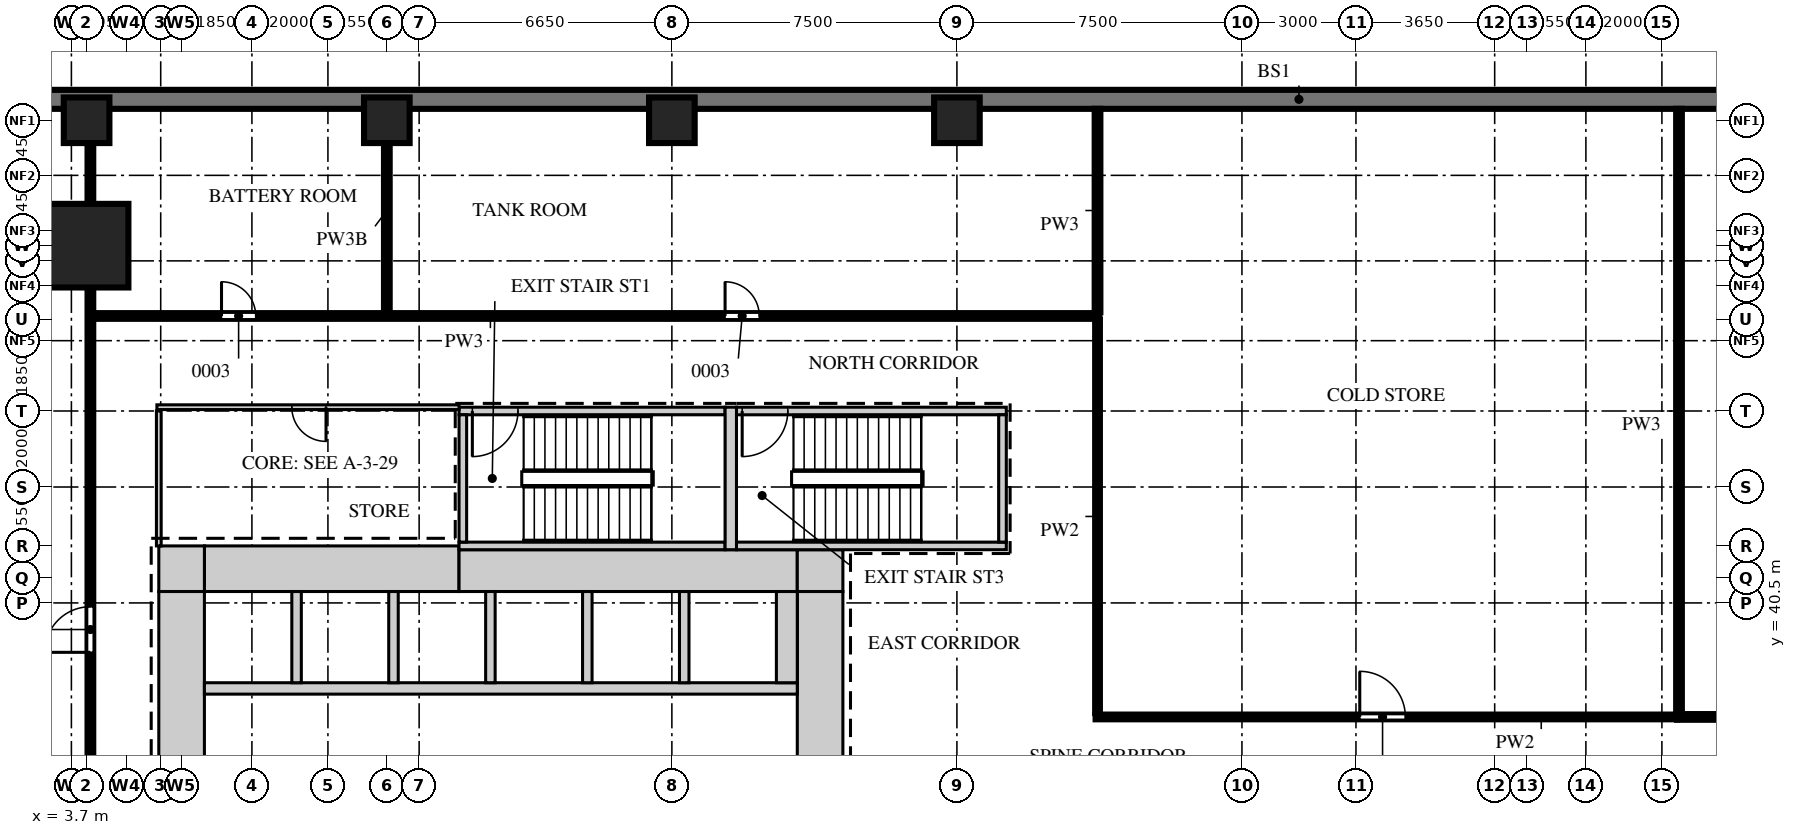
"""IFC4 building model, lengths in metres.
Left out: names, types, materials, properties, quantities, classifications, styles, units other than length and angle.
Written with IfcOpenShell. Run it as: python <this file> out.ifc"""

import sys

from ifc_helpers import new_model, si_unit, direction, frame, frame_2d, origin, origin_2d, place, context, subcontext, project, spatial, rectangle, extrude, source, transform, mapped, element, fill, save


model = new_model("IFC4")
c1 = context("Model", 3, precision=1e-05, world=origin(), true_north=direction((0.0, 1.0)))
c2 = subcontext(c1, "Body", "Model", "MODEL_VIEW")
j1 = project(units=[si_unit("LENGTHUNIT", "METRE"), si_unit("PLANEANGLEUNIT", "RADIAN")], contexts=[c1])
p1 = place(None, origin())
s1 = spatial("IfcSite", under=j1, at=p1, CompositionType="ELEMENT")
p2 = place(p1, origin())
s2 = spatial("IfcBuilding", under=s1, at=p2, CompositionType="ELEMENT")
p3 = place(p2, frame((0.0, 0.0, -9.0)))
s3 = spatial("IfcBuildingStorey", under=s2, at=p3, CompositionType="ELEMENT", Elevation=-9.0)
m1 = source(origin(), c2, "Body", "SweptSolid", [
    extrude(rectangle(XDim=6.7, YDim=1.2, at=frame_2d((3.35, 0.0))), origin(), (0.0, 0.0, 1.0), 4.2),
])
p4 = place(p3, frame((7.2, 41.4, 0.0), z_axis=(0.0, 0.0, 1.0), x_axis=(1.0, 0.0, 0.0)))
e1 = element("IfcWall", 1, at=p4, inside=s3, PredefinedType="SHEAR", context=c2, shape_type="MappedRepresentation", body=[
    mapped(m1, transform((0.0, 0.0, 0.0))),
])
m2 = source(origin(), c2, "Body", "SweptSolid", [
    extrude(rectangle(XDim=8.9, YDim=1.1, at=frame_2d((4.45, 0.0))), origin(), (0.0, 0.0, 1.0), 4.2),
])
p5 = place(p3, frame((13.9, 41.35, 0.0), z_axis=(0.0, 0.0, 1.0), x_axis=(1.0, 0.0, 0.0)))
e2 = element("IfcWall", 2, at=p5, inside=s3, PredefinedType="SHEAR", context=c2, shape_type="MappedRepresentation", body=[
    mapped(m2, transform((0.0, 0.0, 0.0))),
])
m3 = source(origin(), c2, "Body", "SweptSolid", [
    extrude(rectangle(XDim=1.2, YDim=1.1, at=frame_2d((0.6, 0.0))), origin(), (0.0, 0.0, 1.0), 4.2),
])
p6 = place(p3, frame((22.8, 41.35, 0.0), z_axis=(0.0, 0.0, 1.0), x_axis=(1.0, 0.0, 0.0)))
e3 = element("IfcWall", 3, at=p6, inside=s3, PredefinedType="SHEAR", context=c2, shape_type="MappedRepresentation", body=[
    mapped(m3, transform((0.0, 0.0, 0.0))),
])
m4 = source(origin(), c2, "Body", "SweptSolid", [
    extrude(rectangle(XDim=1.2, YDim=1.2, at=frame_2d((0.6, 0.0))), origin(), (0.0, 0.0, 1.0), 4.2),
])
p7 = place(p3, frame((6.0, 41.4, 0.0), z_axis=(0.0, 0.0, 1.0), x_axis=(1.0, 0.0, 0.0)))
e4 = element("IfcWall", 4, at=p7, inside=s3, PredefinedType="SHEAR", context=c2, shape_type="MappedRepresentation", body=[
    mapped(m4, transform((0.0, 0.0, 0.0))),
])
m5 = source(origin(), c2, "Body", "SweptSolid", [
    extrude(rectangle(XDim=27.6, YDim=1.2, at=frame_2d((13.8, 0.0))), origin(), (0.0, 0.0, 1.0), 4.2),
])
p8 = place(p3, frame((23.4, 13.2, 0.0), z_axis=(0.0, 0.0, 1.0), x_axis=(0.0, 1.0, 0.0)))
e5 = element("IfcWall", 5, at=p8, inside=s3, PredefinedType="SHEAR", context=c2, shape_type="MappedRepresentation", body=[
    mapped(m5, transform((0.0, 0.0, 0.0))),
])
m6 = source(origin(), c2, "Body", "SweptSolid", [
    extrude(rectangle(XDim=1.2, YDim=2.1, at=frame_2d((0.6, 1.05))), frame((0.0, 0.61, 0.0), z_axis=(0.0, -1.0, 0.0), x_axis=(1.0, 0.0, 0.0)), (0.0, 0.0, 1.0), 1.22),
])
p9 = place(p8, frame((12.15, 0.0, 0.0)))
e6 = element("IfcOpeningElement", 6, at=p9, cuts=e5, PredefinedType="OPENING", context=c2, shape_type="MappedRepresentation", body=[
    mapped(m6, transform((0.0, 0.0, 0.0))),
])
m7 = source(origin(), c2, "Body", "SweptSolid", [
    extrude(rectangle(XDim=0.9, YDim=2.1, at=frame_2d((0.45, 1.05))), frame((0.0, 0.61, 0.0), z_axis=(0.0, -1.0, 0.0), x_axis=(1.0, 0.0, 0.0)), (0.0, 0.0, 1.0), 1.22),
])
p10 = place(p8, frame((4.4, 0.0, 0.0)))
e7 = element("IfcOpeningElement", 7, at=p10, cuts=e5, PredefinedType="OPENING", context=c2, shape_type="MappedRepresentation", body=[
    mapped(m7, transform((0.0, 0.0, 0.0))),
])
p11 = place(p3, frame((6.6, 13.2, 0.0), z_axis=(0.0, 0.0, 1.0), x_axis=(0.0, 1.0, 0.0)))
e8 = element("IfcWall", 8, at=p11, inside=s3, PredefinedType="SHEAR", context=c2, shape_type="MappedRepresentation", body=[
    mapped(m5, transform((0.0, 0.0, 0.0))),
])
m8 = source(origin(), c2, "Body", "SweptSolid", [
    extrude(rectangle(XDim=7.0, YDim=0.2, at=frame_2d((3.5, 0.0))), origin(), (0.0, 0.0, 1.0), 4.2),
])
p12 = place(p3, frame((13.9, 45.55, 0.0), z_axis=(0.0, 0.0, 1.0), x_axis=(1.0, 0.0, 0.0)))
e9 = element("IfcWall", 9, at=p12, inside=s3, PredefinedType="SHEAR", context=c2, shape_type="MappedRepresentation", body=[
    mapped(m8, transform((0.0, 0.0, 0.0))),
])
m9 = source(origin(), c2, "Body", "SweptSolid", [
    extrude(rectangle(XDim=1.2, YDim=2.1, at=frame_2d((0.6, 1.05))), frame((0.0, 0.11, 0.0), z_axis=(0.0, -1.0, 0.0), x_axis=(1.0, 0.0, 0.0)), (0.0, 0.0, 1.0), 0.22),
])
p13 = place(p12, frame((0.35, 0.0, 0.0)))
e10 = element("IfcOpeningElement", 10, at=p13, cuts=e9, PredefinedType="OPENING", context=c2, shape_type="MappedRepresentation", body=[
    mapped(m9, transform((0.0, 0.0, 0.0))),
])
p14 = place(p3, frame((13.9, 42.0, 0.0), z_axis=(0.0, 0.0, 1.0), x_axis=(1.0, 0.0, 0.0)))
e11 = element("IfcWall", 11, at=p14, inside=s3, PredefinedType="SHEAR", context=c2, shape_type="MappedRepresentation", body=[
    mapped(m8, transform((0.0, 0.0, 0.0))),
])
m10 = source(origin(), c2, "Body", "SweptSolid", [
    extrude(rectangle(XDim=7.1, YDim=0.2, at=frame_2d((3.55, 0.0))), origin(), (0.0, 0.0, 1.0), 4.2),
])
p15 = place(p3, frame((21.2, 45.55, 0.0), z_axis=(0.0, 0.0, 1.0), x_axis=(1.0, 0.0, 0.0)))
e12 = element("IfcWall", 12, at=p15, inside=s3, PredefinedType="SHEAR", context=c2, shape_type="MappedRepresentation", body=[
    mapped(m10, transform((0.0, 0.0, 0.0))),
])
p16 = place(p15, frame((0.15, 0.0, 0.0)))
e13 = element("IfcOpeningElement", 13, at=p16, cuts=e12, PredefinedType="OPENING", context=c2, shape_type="MappedRepresentation", body=[
    mapped(m9, transform((0.0, 0.0, 0.0))),
])
p17 = place(p3, frame((21.2, 42.0, 0.0), z_axis=(0.0, 0.0, 1.0), x_axis=(1.0, 0.0, 0.0)))
e14 = element("IfcWall", 14, at=p17, inside=s3, PredefinedType="SHEAR", context=c2, shape_type="MappedRepresentation", body=[
    mapped(m10, transform((0.0, 0.0, 0.0))),
])
m11 = source(origin(), c2, "Body", "SweptSolid", [
    extrude(rectangle(XDim=3.75, YDim=0.3, at=frame_2d((1.875, 0.0))), origin(), (0.0, 0.0, 1.0), 4.2),
])
p18 = place(p3, frame((21.05, 41.9, 0.0), z_axis=(0.0, 0.0, 1.0), x_axis=(0.0, 1.0, 0.0)))
e15 = element("IfcWall", 15, at=p18, inside=s3, PredefinedType="SHEAR", context=c2, shape_type="MappedRepresentation", body=[
    mapped(m11, transform((0.0, 0.0, 0.0))),
])
m12 = source(origin(), c2, "Body", "SweptSolid", [
    extrude(rectangle(XDim=3.35, YDim=0.2, at=frame_2d((1.675, 0.0))), origin(), (0.0, 0.0, 1.0), 4.2),
])
for number, where, z_axis, x_axis in (
    (16, (14.0, 42.1, 0.0), (0.0, 0.0, 1.0), (0.0, 1.0, 0.0)),
    (17, (28.2, 42.1, 0.0), (0.0, 0.0, 1.0), (0.0, 1.0, 0.0)),
):
    element("IfcWall", number, at=place(p3, frame(where, z_axis=z_axis, x_axis=x_axis)), inside=s3, PredefinedType="SHEAR", context=c2, shape_type="MappedRepresentation", body=[
        mapped(m12, transform((0.0, 0.0, 0.0))),
    ])
m13 = source(origin(), c2, "Body", "SweptSolid", [
    extrude(rectangle(XDim=15.6, YDim=0.3, at=frame_2d((7.8, 0.0))), origin(), (0.0, 0.0, 1.0), 4.2),
])
p19 = place(p3, frame((7.2, 38.25, 0.0), z_axis=(0.0, 0.0, 1.0), x_axis=(1.0, 0.0, 0.0)))
e18 = element("IfcWall", 18, at=p19, inside=s3, PredefinedType="STANDARD", context=c2, shape_type="MappedRepresentation", body=[
    mapped(m13, transform((0.0, 0.0, 0.0))),
])
m14 = source(origin(), c2, "Body", "SweptSolid", [
    extrude(rectangle(XDim=2.4, YDim=0.25, at=frame_2d((1.2, 0.0))), origin(), (0.0, 0.0, 1.0), 4.2),
])
for number, where, z_axis, x_axis in (
    (19, (9.625, 38.4, 0.0), (0.0, 0.0, 1.0), (0.0, 1.0, 0.0)),
    (20, (12.175, 38.4, 0.0), (0.0, 0.0, 1.0), (0.0, 1.0, 0.0)),
    (21, (14.725, 38.4, 0.0), (0.0, 0.0, 1.0), (0.0, 1.0, 0.0)),
    (22, (17.275, 38.4, 0.0), (0.0, 0.0, 1.0), (0.0, 1.0, 0.0)),
    (23, (19.825, 38.4, 0.0), (0.0, 0.0, 1.0), (0.0, 1.0, 0.0)),
):
    element("IfcWall", number, at=place(p3, frame(where, z_axis=z_axis, x_axis=x_axis)), inside=s3, PredefinedType="STANDARD", context=c2, shape_type="MappedRepresentation", body=[
        mapped(m14, transform((0.0, 0.0, 0.0))),
    ])
m15 = source(origin(), c2, "Body", "SweptSolid", [
    extrude(rectangle(XDim=2.4, YDim=0.55, at=frame_2d((1.2, 0.0))), origin(), (0.0, 0.0, 1.0), 4.2),
])
p20 = place(p3, frame((22.525, 38.4, 0.0), z_axis=(0.0, 0.0, 1.0), x_axis=(0.0, 1.0, 0.0)))
e24 = element("IfcWall", 24, at=p20, inside=s3, PredefinedType="STANDARD", context=c2, shape_type="MappedRepresentation", body=[
    mapped(m15, transform((0.0, 0.0, 0.0))),
])
m16 = source(origin(), c2, "Body", "SweptSolid", [
    extrude(rectangle(XDim=90.0, YDim=0.5, at=frame_2d((45.0, 0.0))), origin(), (0.0, 0.0, 1.0), 4.2),
])
p21 = place(p3, frame((-9.0, 53.75, 0.0), z_axis=(0.0, 0.0, 1.0), x_axis=(1.0, 0.0, 0.0)))
e25 = element("IfcWall", 25, at=p21, inside=s3, PredefinedType="STANDARD", context=c2, shape_type="MappedRepresentation", body=[
    mapped(m16, transform((0.0, 0.0, 0.0))),
])
m17 = source(origin(), c2, "Body", "SweptSolid", [
    extrude(rectangle(XDim=2.2, YDim=2.2, at=origin_2d()), origin(), (0.0, 0.0, 1.0), 4.5),
])
p22 = place(p3, frame((4.1, 49.9, 0.0), z_axis=(0.0, 0.0, 1.0), x_axis=(1.0, 0.0, 0.0)))
e26 = element("IfcColumn", 26, at=p22, inside=s3, PredefinedType="COLUMN", context=c2, shape_type="MappedRepresentation", body=[
    mapped(m17, transform((0.0, 0.0, 0.0))),
])
m18 = source(origin(), c2, "Body", "SweptSolid", [
    extrude(rectangle(XDim=1.2, YDim=1.2, at=origin_2d()), origin(), (0.0, 0.0, 1.0), 4.2),
])
for number, where, z_axis, x_axis in (
    (27, (4.1, 53.2, 0.0), (0.0, 0.0, 1.0), (1.0, 0.0, 0.0)),
    (28, (12.0, 53.2, 0.0), (0.0, 0.0, 1.0), (1.0, 0.0, 0.0)),
    (29, (19.5, 53.2, 0.0), (0.0, 0.0, 1.0), (1.0, 0.0, 0.0)),
    (30, (27.0, 53.2, 0.0), (0.0, 0.0, 1.0), (1.0, 0.0, 0.0)),
):
    element("IfcColumn", number, at=place(p3, frame(where, z_axis=z_axis, x_axis=x_axis)), inside=s3, PredefinedType="COLUMN", context=c2, shape_type="MappedRepresentation", body=[
        mapped(m18, transform((0.0, 0.0, 0.0))),
    ])
m19 = source(origin(), c2, "Body", "SweptSolid", [
    extrude(rectangle(XDim=53.0, YDim=0.15, at=frame_2d((26.5, 0.0))), origin(), (0.0, 0.0, 1.0), 4.2),
])
p23 = place(p3, frame((4.2, 0.5, 0.0), z_axis=(0.0, 0.0, 1.0), x_axis=(0.0, 1.0, 0.0)))
e31 = element("IfcWall", 31, at=p23, inside=s3, PredefinedType="PARTITIONING", context=c2, shape_type="MappedRepresentation", body=[
    mapped(m19, transform((0.0, 0.0, 0.0))),
])
m20 = source(origin(), c2, "Body", "SweptSolid", [
    extrude(rectangle(XDim=1.2, YDim=2.1, at=frame_2d((0.6, 1.05))), frame((0.0, 0.085, 0.0), z_axis=(0.0, -1.0, 0.0), x_axis=(1.0, 0.0, 0.0)), (0.0, 0.0, 1.0), 0.17),
])
p24 = place(p23, frame((11.1, 0.0, 0.0)))
e32 = element("IfcOpeningElement", 32, at=p24, cuts=e31, PredefinedType="OPENING", context=c2, shape_type="MappedRepresentation", body=[
    mapped(m20, transform((0.0, 0.0, 0.0))),
])
p25 = place(p23, frame((23.9, 0.0, 0.0)))
e33 = element("IfcOpeningElement", 33, at=p25, cuts=e31, PredefinedType="OPENING", context=c2, shape_type="MappedRepresentation", body=[
    mapped(m20, transform((0.0, 0.0, 0.0))),
])
p26 = place(p23, frame((38.7, 0.0, 0.0)))
e34 = element("IfcOpeningElement", 34, at=p26, cuts=e31, PredefinedType="OPENING", context=c2, shape_type="MappedRepresentation", body=[
    mapped(m20, transform((0.0, 0.0, 0.0))),
])
m21 = source(origin(), c2, "Body", "SweptSolid", [
    extrude(rectangle(XDim=15.3, YDim=0.125, at=frame_2d((7.65, 0.0))), origin(), (0.0, 0.0, 1.0), 4.2),
])
p27 = place(p3, frame((30.65, 37.5, 0.0), z_axis=(0.0, 0.0, 1.0), x_axis=(1.0, 0.0, 0.0)))
e35 = element("IfcWall", 35, at=p27, inside=s3, PredefinedType="PARTITIONING", context=c2, shape_type="MappedRepresentation", body=[
    mapped(m21, transform((0.0, 0.0, 0.0))),
])
m22 = source(origin(), c2, "Body", "SweptSolid", [
    extrude(rectangle(XDim=1.2, YDim=2.1, at=frame_2d((0.6, 1.05))), frame((0.0, 0.073, 0.0), z_axis=(0.0, -1.0, 0.0), x_axis=(1.0, 0.0, 0.0)), (0.0, 0.0, 1.0), 0.145),
])
p28 = place(p27, frame((6.95, 0.0, 0.0)))
e36 = element("IfcOpeningElement", 36, at=p28, cuts=e35, PredefinedType="OPENING", context=c2, shape_type="MappedRepresentation", body=[
    mapped(m22, transform((0.0, 0.0, 0.0))),
])
m23 = source(origin(), c2, "Body", "SweptSolid", [
    extrude(rectangle(XDim=34.55, YDim=0.15, at=frame_2d((17.275, 0.0))), origin(), (0.0, 0.0, 1.0), 4.2),
])
p29 = place(p3, frame((45.95, 37.5, 0.0), z_axis=(0.0, 0.0, 1.0), x_axis=(1.0, 0.0, 0.0)))
e37 = element("IfcWall", 37, at=p29, inside=s3, PredefinedType="PARTITIONING", context=c2, shape_type="MappedRepresentation", body=[
    mapped(m23, transform((0.0, 0.0, 0.0))),
])
p30 = place(p29, frame((7.45, 0.0, 0.0)))
e38 = element("IfcOpeningElement", 38, at=p30, cuts=e37, PredefinedType="OPENING", context=c2, shape_type="MappedRepresentation", body=[
    mapped(m20, transform((0.0, 0.0, 0.0))),
])
p31 = place(p29, frame((24.95, 0.0, 0.0)))
e39 = element("IfcOpeningElement", 39, at=p31, cuts=e37, PredefinedType="OPENING", context=c2, shape_type="MappedRepresentation", body=[
    mapped(m20, transform((0.0, 0.0, 0.0))),
])
m24 = source(origin(), c2, "Body", "SweptSolid", [
    extrude(rectangle(XDim=10.35, YDim=0.125, at=frame_2d((5.175, 0.0))), origin(), (0.0, 0.0, 1.0), 4.2),
])
p32 = place(p3, frame((30.7, 37.6, 0.0), z_axis=(0.0, 0.0, 1.0), x_axis=(0.0, 1.0, 0.0)))
e40 = element("IfcWall", 40, at=p32, inside=s3, PredefinedType="PARTITIONING", context=c2, shape_type="MappedRepresentation", body=[
    mapped(m24, transform((0.0, 0.0, 0.0))),
])
m25 = source(origin(), c2, "Body", "SweptSolid", [
    extrude(rectangle(XDim=15.9, YDim=0.15, at=frame_2d((7.95, 0.0))), origin(), (0.0, 0.0, 1.0), 4.2),
])
p33 = place(p3, frame((46.0, 37.6, 0.0), z_axis=(0.0, 0.0, 1.0), x_axis=(0.0, 1.0, 0.0)))
e41 = element("IfcWall", 41, at=p33, inside=s3, PredefinedType="PARTITIONING", context=c2, shape_type="MappedRepresentation", body=[
    mapped(m25, transform((0.0, 0.0, 0.0))),
])
m26 = source(origin(), c2, "Body", "SweptSolid", [
    extrude(rectangle(XDim=3.55, YDim=0.125, at=frame_2d((1.775, 0.0))), origin(), (0.0, 0.0, 1.0), 4.2),
])
p34 = place(p3, frame((6.0, 42.0, 0.0), z_axis=(0.0, 0.0, 1.0), x_axis=(0.0, 1.0, 0.0)))
e42 = element("IfcWall", 42, at=p34, inside=s3, PredefinedType="PARTITIONING", context=c2, shape_type="MappedRepresentation", body=[
    mapped(m26, transform((0.0, 0.0, 0.0))),
])
m27 = source(origin(), c2, "Body", "SweptSolid", [
    extrude(rectangle(XDim=7.95, YDim=0.125, at=frame_2d((3.975, 0.0))), origin(), (0.0, 0.0, 1.0), 4.2),
])
p35 = place(p3, frame((5.95, 45.65, 0.0), z_axis=(0.0, 0.0, 1.0), x_axis=(1.0, 0.0, 0.0)))
e43 = element("IfcWall", 43, at=p35, inside=s3, PredefinedType="PARTITIONING", context=c2, shape_type="MappedRepresentation", body=[
    mapped(m27, transform((0.0, 0.0, 0.0))),
])
m28 = source(origin(), c2, "Body", "SweptSolid", [
    extrude(rectangle(XDim=0.9, YDim=2.1, at=frame_2d((0.45, 1.05))), frame((0.0, 0.073, 0.0), z_axis=(0.0, -1.0, 0.0), x_axis=(1.0, 0.0, 0.0)), (0.0, 0.0, 1.0), 0.145),
])
p36 = place(p35, frame((3.55, 0.0, 0.0)))
e44 = element("IfcOpeningElement", 44, at=p36, cuts=e43, PredefinedType="OPENING", context=c2, shape_type="MappedRepresentation", body=[
    mapped(m28, transform((0.0, 0.0, 0.0))),
])
m29 = source(origin(), c2, "Body", "SweptSolid", [
    extrude(rectangle(XDim=26.45, YDim=0.15, at=frame_2d((13.225, 0.0))), origin(), (0.0, 0.0, 1.0), 4.2),
])
p37 = place(p3, frame((4.3, 48.05, 0.0), z_axis=(0.0, 0.0, 1.0), x_axis=(1.0, 0.0, 0.0)))
e45 = element("IfcWall", 45, at=p37, inside=s3, PredefinedType="PARTITIONING", context=c2, shape_type="MappedRepresentation", body=[
    mapped(m29, transform((0.0, 0.0, 0.0))),
])
m30 = source(origin(), c2, "Body", "SweptSolid", [
    extrude(rectangle(XDim=0.9, YDim=2.1, at=frame_2d((0.45, 1.05))), frame((0.0, 0.085, 0.0), z_axis=(0.0, -1.0, 0.0), x_axis=(1.0, 0.0, 0.0)), (0.0, 0.0, 1.0), 0.17),
])
p38 = place(p37, frame((3.35, 0.0, 0.0)))
e46 = element("IfcOpeningElement", 46, at=p38, cuts=e45, PredefinedType="OPENING", context=c2, shape_type="MappedRepresentation", body=[
    mapped(m30, transform((0.0, 0.0, 0.0))),
])
p39 = place(p37, frame((16.6, 0.0, 0.0)))
e47 = element("IfcOpeningElement", 47, at=p39, cuts=e45, PredefinedType="OPENING", context=c2, shape_type="MappedRepresentation", body=[
    mapped(m30, transform((0.0, 0.0, 0.0))),
])
m31 = source(origin(), c2, "Body", "SweptSolid", [
    extrude(rectangle(XDim=5.35, YDim=0.15, at=frame_2d((2.675, 0.0))), origin(), (0.0, 0.0, 1.0), 3.7),
])
p40 = place(p3, frame((12.0, 48.15, 0.0), z_axis=(0.0, 0.0, 1.0), x_axis=(0.0, 1.0, 0.0)))
e48 = element("IfcWall", 48, at=p40, inside=s3, PredefinedType="PARTITIONING", context=c2, shape_type="MappedRepresentation", body=[
    mapped(m31, transform((0.0, 0.0, 0.0))),
])
m32 = source(origin(), c2, "Body", "SweptSolid", [
    extrude(rectangle(XDim=5.35, YDim=0.15, at=frame_2d((2.675, 0.0))), origin(), (0.0, 0.0, 1.0), 4.2),
])
p41 = place(p3, frame((30.7, 48.15, 0.0), z_axis=(0.0, 0.0, 1.0), x_axis=(0.0, 1.0, 0.0)))
e49 = element("IfcWall", 49, at=p41, inside=s3, PredefinedType="PARTITIONING", context=c2, shape_type="MappedRepresentation", body=[
    mapped(m32, transform((0.0, 0.0, 0.0))),
])
m33 = source(origin(), c2, "Body", "SweptSolid", [
    extrude(rectangle(XDim=1.2, YDim=2.1, at=frame_2d((0.6, 1.05))), frame((0.0, 0.025, 0.0), z_axis=(0.0, -1.0, 0.0), x_axis=(1.0, 0.0, 0.0)), (0.0, 0.0, 1.0), 0.05),
])
p42 = place(p28, origin())
e50 = element("IfcDoor", 50, at=p42, inside=s3, OperationType="SINGLE_SWING_RIGHT", PredefinedType="DOOR", context=c2, shape_type="MappedRepresentation", body=[
    mapped(m33, transform((0.0, 0.0, 0.0))),
])
fill(e36, e50)
m34 = source(origin(), c2, "Body", "SweptSolid", [
    extrude(rectangle(XDim=0.9, YDim=2.1, at=frame_2d((0.45, 1.05))), frame((0.0, 0.025, 0.0), z_axis=(0.0, -1.0, 0.0), x_axis=(1.0, 0.0, 0.0)), (0.0, 0.0, 1.0), 0.05),
])
p43 = place(p38, origin())
e51 = element("IfcDoor", 51, at=p43, inside=s3, OperationType="SINGLE_SWING_RIGHT", PredefinedType="DOOR", context=c2, shape_type="MappedRepresentation", body=[
    mapped(m34, transform((0.0, 0.0, 0.0))),
])
fill(e46, e51)
p44 = place(p39, origin())
e52 = element("IfcDoor", 52, at=p44, inside=s3, OperationType="SINGLE_SWING_RIGHT", PredefinedType="DOOR", context=c2, shape_type="MappedRepresentation", body=[
    mapped(m34, transform((0.0, 0.0, 0.0))),
])
fill(e47, e52)
p45 = place(p36, origin())
e53 = element("IfcDoor", 53, at=p45, inside=s3, OperationType="SINGLE_SWING_RIGHT", PredefinedType="DOOR", context=c2, shape_type="MappedRepresentation", body=[
    mapped(m34, transform((0.0, 0.0, 0.0))),
])
fill(e44, e53)
p46 = place(p26, origin())
e54 = element("IfcDoor", 54, at=p46, inside=s3, OperationType="SINGLE_SWING_RIGHT", PredefinedType="DOOR", context=c2, shape_type="MappedRepresentation", body=[
    mapped(m33, transform((0.0, 0.0, 0.0))),
])
fill(e34, e54)
p47 = place(p13, origin())
e55 = element("IfcDoor", 55, at=p47, inside=s3, OperationType="SINGLE_SWING_LEFT", PredefinedType="DOOR", context=c2, shape_type="MappedRepresentation", body=[
    mapped(m33, transform((0.0, 0.0, 0.0))),
])
fill(e10, e55)
p48 = place(p16, origin())
e56 = element("IfcDoor", 56, at=p48, inside=s3, OperationType="SINGLE_SWING_LEFT", PredefinedType="DOOR", context=c2, shape_type="MappedRepresentation", body=[
    mapped(m33, transform((0.0, 0.0, 0.0))),
])
fill(e13, e56)
save(model, sys.argv[1])
